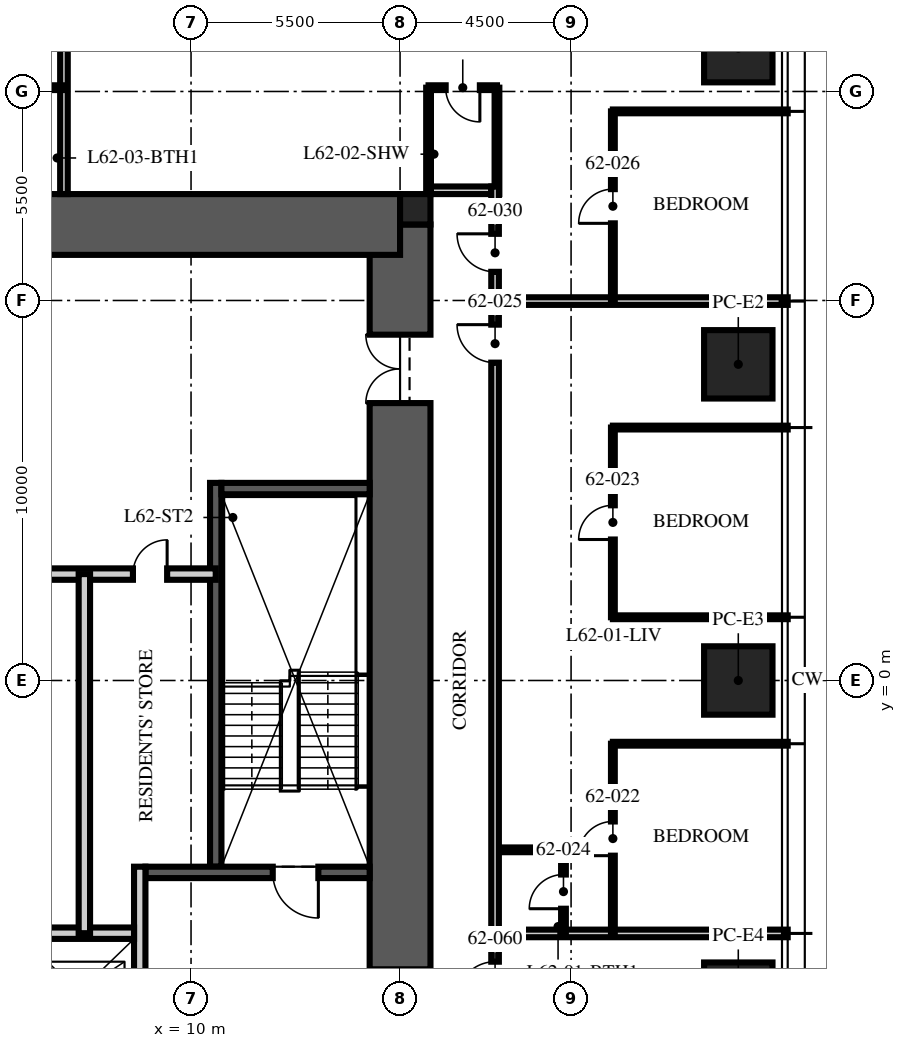
"""IFC4 building model, lengths in metres.
Left out: names, types, materials, properties, quantities, classifications, styles, units other than length and angle.
Written with IfcOpenShell. Run it as: python <this file> out.ifc"""

import sys

from ifc_helpers import new_model, si_unit, direction, frame, frame_2d, origin, origin_2d, place, context, subcontext, project, spatial, rectangle, extrude, element, fill, save


model = new_model("IFC4")
c1 = context("Model", 3, precision=1e-05, world=origin(), true_north=direction((0.0, 1.0)))
c2 = subcontext(c1, "Body", "Model", "MODEL_VIEW")
j1 = project(units=[si_unit("LENGTHUNIT", "METRE"), si_unit("PLANEANGLEUNIT", "RADIAN")], contexts=[c1])
p1 = place(None, origin())
s1 = spatial("IfcSite", under=j1, at=p1, CompositionType="ELEMENT")
p2 = place(p1, origin())
s2 = spatial("IfcBuilding", under=s1, at=p2, CompositionType="ELEMENT")
p3 = place(p2, frame((0.0, 0.0, 248.25)))
s3 = spatial("IfcBuildingStorey", under=s2, at=p3, CompositionType="ELEMENT", Elevation=248.25)
p4 = place(p3, frame((15.5, -12.0, -0.25), z_axis=(0.0, 0.0, 1.0), x_axis=(0.0, 1.0, 0.0)))
e1 = element("IfcWall", 1, at=p4, inside=s3, PredefinedType="SHEAR", context=c2, shape_type="SweptSolid", body=[
    extrude(rectangle(XDim=24.0, YDim=1.6, at=frame_2d((12.0, 0.0))), origin(), (0.0, 0.0, 1.0), 3.75),
])
p5 = place(p4, frame((3.2, 0.0, 0.25)))
e2 = element("IfcOpeningElement", 2, at=p5, cuts=e1, PredefinedType="OPENING", context=c2, shape_type="SweptSolid", body=[
    extrude(rectangle(XDim=1.2, YDim=2.1, at=frame_2d((0.6, 1.05))), frame((0.0, 0.81, 0.0), z_axis=(0.0, -1.0, 0.0), x_axis=(1.0, 0.0, 0.0)), (0.0, 0.0, 1.0), 1.62),
])
p6 = place(p4, frame((19.3, 0.0, 0.25)))
e3 = element("IfcOpeningElement", 3, at=p6, cuts=e1, PredefinedType="OPENING", context=c2, shape_type="SweptSolid", body=[
    extrude(rectangle(XDim=1.8, YDim=2.1, at=frame_2d((0.9, 1.05))), frame((0.0, 0.81, 0.0), z_axis=(0.0, -1.0, 0.0), x_axis=(1.0, 0.0, 0.0)), (0.0, 0.0, 1.0), 1.62),
])
p7 = place(p3, frame((-15.5, 12.0, -0.25), z_axis=(0.0, 0.0, 1.0), x_axis=(1.0, 0.0, 0.0)))
e4 = element("IfcWall", 4, at=p7, inside=s3, PredefinedType="SHEAR", context=c2, shape_type="SweptSolid", body=[
    extrude(rectangle(XDim=31.0, YDim=1.6, at=frame_2d((15.5, 0.0))), origin(), (0.0, 0.0, 1.0), 3.75),
])
p8 = place(p3, frame((15.9, 12.4, -0.25), z_axis=(0.0, 0.0, 1.0), x_axis=(1.0, 0.0, 0.0)))
e5 = element("IfcColumn", 5, at=p8, inside=s3, PredefinedType="COLUMN", context=c2, shape_type="SweptSolid", body=[
    extrude(rectangle(XDim=0.8, YDim=0.8, at=origin_2d()), origin(), (0.0, 0.0, 1.0), 3.75),
])
for number, where, z_axis, x_axis in (
    (6, (24.4, 16.64, 0.0), (0.0, 0.0, 1.0), (0.0, 1.0, 0.0)),
    (7, (24.4, 8.32, 0.0), (0.0, 0.0, 1.0), (0.0, 1.0, 0.0)),
    (8, (24.4, 0.0, 0.0), (0.0, 0.0, 1.0), (0.0, 1.0, 0.0)),
    (9, (24.4, -8.32, 0.0), (0.0, 0.0, 1.0), (0.0, 1.0, 0.0)),
):
    element("IfcColumn", number, at=place(p3, frame(where, z_axis=z_axis, x_axis=x_axis)), inside=s3, PredefinedType="COLUMN", context=c2, shape_type="SweptSolid", body=[
        extrude(rectangle(XDim=1.8, YDim=1.8, at=origin_2d()), origin(), (0.0, 0.0, 1.0), 3.75),
    ])
p9 = place(p3, frame((10.65, -4.9, 0.0), z_axis=(0.0, 0.0, 1.0), x_axis=(0.0, 1.0, 0.0)))
e10 = element("IfcWall", 10, at=p9, inside=s3, PredefinedType="SOLIDWALL", context=c2, shape_type="SweptSolid", body=[
    extrude(rectangle(XDim=10.1, YDim=0.3, at=frame_2d((5.05, 0.0))), origin(), (0.0, 0.0, 1.0), 3.5),
])
p10 = place(p3, frame((14.7, -5.05, 0.0), z_axis=(0.0, 0.0, 1.0), x_axis=(-1.0, 0.0, 0.0)))
e11 = element("IfcWall", 11, at=p10, inside=s3, PredefinedType="SOLIDWALL", context=c2, shape_type="SweptSolid", body=[
    extrude(rectangle(XDim=5.9, YDim=0.3, at=frame_2d((2.95, 0.0))), origin(), (0.0, 0.0, 1.0), 3.5),
])
p11 = place(p10, frame((1.35, 0.0, 0.0)))
e12 = element("IfcOpeningElement", 12, at=p11, cuts=e11, PredefinedType="OPENING", context=c2, shape_type="SweptSolid", body=[
    extrude(rectangle(XDim=1.2, YDim=2.1, at=frame_2d((0.6, 1.05))), frame((0.0, 0.16, 0.0), z_axis=(0.0, -1.0, 0.0), x_axis=(1.0, 0.0, 0.0)), (0.0, 0.0, 1.0), 0.32),
])
p12 = place(p3, frame((14.7, 5.05, 0.0), z_axis=(0.0, 0.0, 1.0), x_axis=(-1.0, 0.0, 0.0)))
e13 = element("IfcWall", 13, at=p12, inside=s3, PredefinedType="SOLIDWALL", context=c2, shape_type="SweptSolid", body=[
    extrude(rectangle(XDim=3.9, YDim=0.3, at=frame_2d((1.95, 0.0))), origin(), (0.0, 0.0, 1.0), 3.5),
])
p13 = place(p3, frame((8.65, -11.2, 0.0), z_axis=(0.0, 0.0, 1.0), x_axis=(0.0, 1.0, 0.0)))
e14 = element("IfcWall", 14, at=p13, inside=s3, PredefinedType="PARTITIONING", context=c2, shape_type="SweptSolid", body=[
    extrude(rectangle(XDim=6.3, YDim=0.3, at=frame_2d((3.15, 0.0))), origin(), (0.0, 0.0, 1.0), 3.5),
])
p14 = place(p13, frame((2.45, 0.0, 0.0)))
e15 = element("IfcOpeningElement", 15, at=p14, cuts=e14, PredefinedType="OPENING", context=c2, shape_type="SweptSolid", body=[
    extrude(rectangle(XDim=1.1, YDim=2.1, at=frame_2d((0.55, 1.05))), frame((0.0, 0.16, 0.0), z_axis=(0.0, -1.0, 0.0), x_axis=(1.0, 0.0, 0.0)), (0.0, 0.0, 1.0), 0.32),
])
p15 = place(p3, frame((-8.5, -6.65, 0.0), z_axis=(0.0, 0.0, 1.0), x_axis=(1.0, 0.0, 0.0)))
e16 = element("IfcWall", 16, at=p15, inside=s3, PredefinedType="PARTITIONING", context=c2, shape_type="SweptSolid", body=[
    extrude(rectangle(XDim=17.0, YDim=0.3, at=frame_2d((8.5, 0.0))), origin(), (0.0, 0.0, 1.0), 3.5),
])
p16 = place(p15, frame((7.8, 0.0, 0.0)))
e17 = element("IfcOpeningElement", 17, at=p16, cuts=e16, PredefinedType="OPENING", context=c2, shape_type="SweptSolid", body=[
    extrude(rectangle(XDim=1.3, YDim=2.4, at=frame_2d((0.65, 1.2))), frame((0.0, 0.16, 0.0), z_axis=(0.0, -1.0, 0.0), x_axis=(1.0, 0.0, 0.0)), (0.0, 0.0, 1.0), 0.32),
])
p17 = place(p15, frame((5.65, 0.0, 0.0)))
e18 = element("IfcOpeningElement", 18, at=p17, cuts=e16, PredefinedType="OPENING", context=c2, shape_type="SweptSolid", body=[
    extrude(rectangle(XDim=0.9, YDim=2.1, at=frame_2d((0.45, 1.05))), frame((0.0, 0.16, 0.0), z_axis=(0.0, -1.0, 0.0), x_axis=(1.0, 0.0, 0.0)), (0.0, 0.0, 1.0), 0.32),
])
p18 = place(p15, frame((10.4, 0.0, 0.0)))
e19 = element("IfcOpeningElement", 19, at=p18, cuts=e16, PredefinedType="OPENING", context=c2, shape_type="SweptSolid", body=[
    extrude(rectangle(XDim=0.9, YDim=2.1, at=frame_2d((0.45, 1.05))), frame((0.0, 0.16, 0.0), z_axis=(0.0, -1.0, 0.0), x_axis=(1.0, 0.0, 0.0)), (0.0, 0.0, 1.0), 0.32),
])
p19 = place(p3, frame((-10.65, 2.8, 0.0), z_axis=(0.0, 0.0, 1.0), x_axis=(1.0, 0.0, 0.0)))
e20 = element("IfcWall", 20, at=p19, inside=s3, PredefinedType="PARTITIONING", context=c2, shape_type="SweptSolid", body=[
    extrude(rectangle(XDim=21.3, YDim=0.3, at=frame_2d((10.65, 0.0))), origin(), (0.0, 0.0, 1.0), 3.5),
])
p20 = place(p19, frame((10.05, 0.0, 0.0)))
e21 = element("IfcOpeningElement", 21, at=p20, cuts=e20, PredefinedType="OPENING", context=c2, shape_type="SweptSolid", body=[
    extrude(rectangle(XDim=1.2, YDim=2.1, at=frame_2d((0.6, 1.05))), frame((0.0, 0.16, 0.0), z_axis=(0.0, -1.0, 0.0), x_axis=(1.0, 0.0, 0.0)), (0.0, 0.0, 1.0), 0.32),
])
p21 = place(p19, frame((19.121, 0.0, 0.0)))
e22 = element("IfcOpeningElement", 22, at=p21, cuts=e20, PredefinedType="OPENING", context=c2, shape_type="SweptSolid", body=[
    extrude(rectangle(XDim=0.9, YDim=2.1, at=frame_2d((0.45, 1.05))), frame((0.0, 0.16, 0.0), z_axis=(0.0, -1.0, 0.0), x_axis=(1.0, 0.0, 0.0)), (0.0, 0.0, 1.0), 0.32),
])
p22 = place(p3, frame((7.193, -6.65, 0.0), z_axis=(0.0, 0.0, 1.0), x_axis=(0.0, 1.0, 0.0)))
e23 = element("IfcWall", 23, at=p22, inside=s3, PredefinedType="PARTITIONING", context=c2, shape_type="SweptSolid", body=[
    extrude(rectangle(XDim=9.45, YDim=0.3, at=frame_2d((4.725, 0.0))), origin(), (0.0, 0.0, 1.0), 3.5),
])
p23 = place(p3, frame((16.3, 12.9, 0.0), z_axis=(0.0, 0.0, 1.0), x_axis=(1.0, 0.0, 0.0)))
e24 = element("IfcWall", 24, at=p23, inside=s3, PredefinedType="PARTITIONING", context=c2, shape_type="SweptSolid", body=[
    extrude(rectangle(XDim=1.6, YDim=0.2, at=frame_2d((0.8, 0.0))), origin(), (0.0, 0.0, 1.0), 2.3),
])
p24 = place(p3, frame((18.1, -6.656, 0.0), z_axis=(0.0, 0.0, 1.0), x_axis=(1.0, 0.0, 0.0)))
e25 = element("IfcWall", 25, at=p24, inside=s3, PredefinedType="PARTITIONING", context=c2, shape_type="SweptSolid", body=[
    extrude(rectangle(XDim=7.6, YDim=0.2, at=frame_2d((3.8, 0.0))), origin(), (0.0, 0.0, 1.0), 2.91),
])
for number, where, z_axis, x_axis in (
    (26, (21.1, -1.664, 0.0), (0.0, 0.0, 1.0), (1.0, 0.0, 0.0)),
    (27, (21.1, 1.664, 0.0), (0.0, 0.0, 1.0), (1.0, 0.0, 0.0)),
    (28, (21.1, 6.656, 0.0), (0.0, 0.0, 1.0), (1.0, 0.0, 0.0)),
):
    element("IfcWall", number, at=place(p3, frame(where, z_axis=z_axis, x_axis=x_axis)), inside=s3, PredefinedType="PARTITIONING", context=c2, shape_type="SweptSolid", body=[
        extrude(rectangle(XDim=4.6, YDim=0.1, at=frame_2d((2.3, 0.0))), origin(), (0.0, 0.0, 1.0), 2.91),
    ])
p25 = place(p3, frame((18.1, 9.984, 0.0), z_axis=(0.0, 0.0, 1.0), x_axis=(1.0, 0.0, 0.0)))
e29 = element("IfcWall", 29, at=p25, inside=s3, PredefinedType="PARTITIONING", context=c2, shape_type="SweptSolid", body=[
    extrude(rectangle(XDim=7.6, YDim=0.2, at=frame_2d((3.8, 0.0))), origin(), (0.0, 0.0, 1.0), 2.91),
])
p26 = place(p3, frame((21.1, 14.976, 0.0), z_axis=(0.0, 0.0, 1.0), x_axis=(1.0, 0.0, 0.0)))
e30 = element("IfcWall", 30, at=p26, inside=s3, PredefinedType="PARTITIONING", context=c2, shape_type="SweptSolid", body=[
    extrude(rectangle(XDim=4.6, YDim=0.1, at=frame_2d((2.3, 0.0))), origin(), (0.0, 0.0, 1.0), 2.91),
])
p27 = place(p3, frame((6.656, 12.8, 0.0), z_axis=(0.0, 0.0, 1.0), x_axis=(0.0, 1.0, 0.0)))
e31 = element("IfcWall", 31, at=p27, inside=s3, PredefinedType="PARTITIONING", context=c2, shape_type="SweptSolid", body=[
    extrude(rectangle(XDim=12.9, YDim=0.2, at=frame_2d((6.45, 0.0))), origin(), (0.0, 0.0, 1.0), 2.91),
])
p28 = place(p3, frame((21.1, -6.656, 0.0), z_axis=(0.0, 0.0, 1.0), x_axis=(0.0, 1.0, 0.0)))
e32 = element("IfcWall", 32, at=p28, inside=s3, PredefinedType="PARTITIONING", context=c2, shape_type="SweptSolid", body=[
    extrude(rectangle(XDim=4.992, YDim=0.1, at=frame_2d((2.496, 0.0))), origin(), (0.0, 0.0, 1.0), 2.81),
])
p29 = place(p28, frame((2.046, 0.0, 0.0)))
e33 = element("IfcOpeningElement", 33, at=p29, cuts=e32, PredefinedType="OPENING", context=c2, shape_type="SweptSolid", body=[
    extrude(rectangle(XDim=0.9, YDim=2.1, at=frame_2d((0.45, 1.05))), frame((0.0, 0.06, 0.0), z_axis=(0.0, -1.0, 0.0), x_axis=(1.0, 0.0, 0.0)), (0.0, 0.0, 1.0), 0.12),
])
p30 = place(p3, frame((21.1, 1.664, 0.0), z_axis=(0.0, 0.0, 1.0), x_axis=(0.0, 1.0, 0.0)))
e34 = element("IfcWall", 34, at=p30, inside=s3, PredefinedType="PARTITIONING", context=c2, shape_type="SweptSolid", body=[
    extrude(rectangle(XDim=4.992, YDim=0.1, at=frame_2d((2.496, 0.0))), origin(), (0.0, 0.0, 1.0), 2.81),
])
p31 = place(p30, frame((2.046, 0.0, 0.0)))
e35 = element("IfcOpeningElement", 35, at=p31, cuts=e34, PredefinedType="OPENING", context=c2, shape_type="SweptSolid", body=[
    extrude(rectangle(XDim=0.9, YDim=2.1, at=frame_2d((0.45, 1.05))), frame((0.0, 0.06, 0.0), z_axis=(0.0, -1.0, 0.0), x_axis=(1.0, 0.0, 0.0)), (0.0, 0.0, 1.0), 0.12),
])
p32 = place(p3, frame((19.8, -6.656, 0.0), z_axis=(0.0, 0.0, 1.0), x_axis=(0.0, 1.0, 0.0)))
e36 = element("IfcWall", 36, at=p32, inside=s3, PredefinedType="PARTITIONING", context=c2, shape_type="SweptSolid", body=[
    extrude(rectangle(XDim=2.2, YDim=0.125, at=frame_2d((1.1, 0.0))), origin(), (0.0, 0.0, 1.0), 3.5),
])
p33 = place(p32, frame((0.65, 0.0, 0.0)))
e37 = element("IfcOpeningElement", 37, at=p33, cuts=e36, PredefinedType="OPENING", context=c2, shape_type="SweptSolid", body=[
    extrude(rectangle(XDim=0.9, YDim=2.1, at=frame_2d((0.45, 1.05))), frame((0.0, 0.073, 0.0), z_axis=(0.0, -1.0, 0.0), x_axis=(1.0, 0.0, 0.0)), (0.0, 0.0, 1.0), 0.145),
])
p34 = place(p3, frame((18.1, -4.456, 0.0), z_axis=(0.0, 0.0, 1.0), x_axis=(1.0, 0.0, 0.0)))
e38 = element("IfcWall", 38, at=p34, inside=s3, PredefinedType="PARTITIONING", context=c2, shape_type="SweptSolid", body=[
    extrude(rectangle(XDim=1.7, YDim=0.125, at=frame_2d((0.85, 0.0))), origin(), (0.0, 0.0, 1.0), 3.5),
])
p35 = place(p3, frame((21.1, 9.984, 0.0), z_axis=(0.0, 0.0, 1.0), x_axis=(0.0, 1.0, 0.0)))
e39 = element("IfcWall", 39, at=p35, inside=s3, PredefinedType="PARTITIONING", context=c2, shape_type="SweptSolid", body=[
    extrude(rectangle(XDim=4.992, YDim=0.1, at=frame_2d((2.496, 0.0))), origin(), (0.0, 0.0, 1.0), 2.81),
])
p36 = place(p35, frame((2.046, 0.0, 0.0)))
e40 = element("IfcOpeningElement", 40, at=p36, cuts=e39, PredefinedType="OPENING", context=c2, shape_type="SweptSolid", body=[
    extrude(rectangle(XDim=0.9, YDim=2.1, at=frame_2d((0.45, 1.05))), frame((0.0, 0.06, 0.0), z_axis=(0.0, -1.0, 0.0), x_axis=(1.0, 0.0, 0.0)), (0.0, 0.0, 1.0), 0.12),
])
p37 = place(p3, frame((18.05, 15.6, 0.0), z_axis=(0.0, 0.0, 1.0), x_axis=(-1.0, 0.0, 0.0)))
e41 = element("IfcWall", 41, at=p37, inside=s3, PredefinedType="PARTITIONING", context=c2, shape_type="SweptSolid", body=[
    extrude(rectangle(XDim=1.8, YDim=0.125, at=frame_2d((0.9, 0.0))), origin(), (0.0, 0.0, 1.0), 2.3),
])
p38 = place(p37, frame((0.45, 0.0, 0.0)))
e42 = element("IfcOpeningElement", 42, at=p38, cuts=e41, PredefinedType="OPENING", context=c2, shape_type="SweptSolid", body=[
    extrude(rectangle(XDim=0.9, YDim=2.1, at=frame_2d((0.45, 1.05))), frame((0.0, 0.073, 0.0), z_axis=(0.0, -1.0, 0.0), x_axis=(1.0, 0.0, 0.0)), (0.0, 0.0, 1.0), 0.145),
])
for number, where, z_axis, x_axis in (
    (43, (18.05, 12.8, 0.0), (0.0, 0.0, 1.0), (0.0, 1.0, 0.0)),
    (44, (16.25, 12.8, 0.0), (0.0, 0.0, 1.0), (0.0, 1.0, 0.0)),
):
    element("IfcWall", number, at=place(p3, frame(where, z_axis=z_axis, x_axis=x_axis)), inside=s3, PredefinedType="PARTITIONING", context=c2, shape_type="SweptSolid", body=[
        extrude(rectangle(XDim=2.8, YDim=0.125, at=frame_2d((1.4, 0.0))), origin(), (0.0, 0.0, 1.0), 2.3),
    ])
p39 = place(p3, frame((6.656, 15.6, 0.0), z_axis=(0.0, 0.0, 1.0), x_axis=(-1.0, 0.0, 0.0)))
e45 = element("IfcWall", 45, at=p39, inside=s3, PredefinedType="PARTITIONING", context=c2, shape_type="SweptSolid", body=[
    extrude(rectangle(XDim=5.5, YDim=0.125, at=frame_2d((2.75, 0.0))), origin(), (0.0, 0.0, 1.0), 2.81),
])
p40 = place(p39, frame((0.65, 0.0, 0.0)))
e46 = element("IfcOpeningElement", 46, at=p40, cuts=e45, PredefinedType="OPENING", context=c2, shape_type="SweptSolid", body=[
    extrude(rectangle(XDim=0.9, YDim=2.1, at=frame_2d((0.45, 1.05))), frame((0.0, 0.073, 0.0), z_axis=(0.0, -1.0, 0.0), x_axis=(1.0, 0.0, 0.0)), (0.0, 0.0, 1.0), 0.145),
])
p41 = place(p39, frame((2.65, 0.0, 0.0)))
e47 = element("IfcOpeningElement", 47, at=p41, cuts=e45, PredefinedType="OPENING", context=c2, shape_type="SweptSolid", body=[
    extrude(rectangle(XDim=0.9, YDim=2.1, at=frame_2d((0.45, 1.05))), frame((0.0, 0.073, 0.0), z_axis=(0.0, -1.0, 0.0), x_axis=(1.0, 0.0, 0.0)), (0.0, 0.0, 1.0), 0.145),
])
p42 = place(p39, frame((4.3, 0.0, 0.0)))
e48 = element("IfcOpeningElement", 48, at=p42, cuts=e45, PredefinedType="OPENING", context=c2, shape_type="SweptSolid", body=[
    extrude(rectangle(XDim=0.9, YDim=2.1, at=frame_2d((0.45, 1.05))), frame((0.0, 0.073, 0.0), z_axis=(0.0, -1.0, 0.0), x_axis=(1.0, 0.0, 0.0)), (0.0, 0.0, 1.0), 0.145),
])
p43 = place(p3, frame((18.0, -13.0, 0.0), z_axis=(0.0, 0.0, 1.0), x_axis=(0.0, 1.0, 0.0)))
e49 = element("IfcWall", 49, at=p43, inside=s3, PredefinedType="PARTITIONING", context=c2, shape_type="SweptSolid", body=[
    extrude(rectangle(XDim=26.0, YDim=0.2, at=frame_2d((13.0, 0.0))), origin(), (0.0, 0.0, 1.0), 2.6),
])
p44 = place(p43, frame((21.364, 0.0, 0.0)))
e50 = element("IfcOpeningElement", 50, at=p44, cuts=e49, PredefinedType="OPENING", context=c2, shape_type="SweptSolid", body=[
    extrude(rectangle(XDim=1.0, YDim=2.2, at=frame_2d((0.5, 1.1))), frame((0.0, 0.11, 0.0), z_axis=(0.0, -1.0, 0.0), x_axis=(1.0, 0.0, 0.0)), (0.0, 0.0, 1.0), 0.22),
])
p45 = place(p43, frame((23.754, 0.0, 0.0)))
e51 = element("IfcOpeningElement", 51, at=p45, cuts=e49, PredefinedType="OPENING", context=c2, shape_type="SweptSolid", body=[
    extrude(rectangle(XDim=1.0, YDim=2.2, at=frame_2d((0.5, 1.1))), frame((0.0, 0.11, 0.0), z_axis=(0.0, -1.0, 0.0), x_axis=(1.0, 0.0, 0.0)), (0.0, 0.0, 1.0), 0.22),
])
p46 = place(p43, frame((4.6, 0.0, 0.0)))
e52 = element("IfcOpeningElement", 52, at=p46, cuts=e49, PredefinedType="OPENING", context=c2, shape_type="SweptSolid", body=[
    extrude(rectangle(XDim=1.0, YDim=2.2, at=frame_2d((0.5, 1.1))), frame((0.0, 0.11, 0.0), z_axis=(0.0, -1.0, 0.0), x_axis=(1.0, 0.0, 0.0)), (0.0, 0.0, 1.0), 0.22),
])
p47 = place(p11, origin())
e53 = element("IfcDoor", 53, at=p47, inside=s3, OperationType="SINGLE_SWING_LEFT", PredefinedType="DOOR", context=c2, shape_type="SweptSolid", body=[
    extrude(rectangle(XDim=1.2, YDim=2.1, at=frame_2d((0.6, 1.05))), frame((0.0, 0.025, 0.0), z_axis=(0.0, -1.0, 0.0), x_axis=(1.0, 0.0, 0.0)), (0.0, 0.0, 1.0), 0.05),
])
fill(e12, e53)
p48 = place(p6, origin())
e54 = element("IfcDoor", 54, at=p48, inside=s3, OperationType="DOUBLE_DOOR_SINGLE_SWING", PredefinedType="DOOR", context=c2, shape_type="SweptSolid", body=[
    extrude(rectangle(XDim=1.8, YDim=2.1, at=frame_2d((0.9, 1.05))), frame((0.0, 0.025, 0.0), z_axis=(0.0, -1.0, 0.0), x_axis=(1.0, 0.0, 0.0)), (0.0, 0.0, 1.0), 0.05),
])
fill(e3, e54)
p49 = place(p21, origin())
e55 = element("IfcDoor", 55, at=p49, inside=s3, OperationType="SINGLE_SWING_RIGHT", PredefinedType="DOOR", context=c2, shape_type="SweptSolid", body=[
    extrude(rectangle(XDim=0.9, YDim=2.1, at=frame_2d((0.45, 1.05))), frame((0.0, 0.025, 0.0), z_axis=(0.0, -1.0, 0.0), x_axis=(1.0, 0.0, 0.0)), (0.0, 0.0, 1.0), 0.05),
])
fill(e22, e55)
p50 = place(p29, origin())
e56 = element("IfcDoor", 56, at=p50, inside=s3, OperationType="SINGLE_SWING_LEFT", PredefinedType="DOOR", context=c2, shape_type="SweptSolid", body=[
    extrude(rectangle(XDim=0.9, YDim=2.1, at=frame_2d((0.45, 1.05))), frame((0.0, 0.025, 0.0), z_axis=(0.0, -1.0, 0.0), x_axis=(1.0, 0.0, 0.0)), (0.0, 0.0, 1.0), 0.05),
])
fill(e33, e56)
p51 = place(p31, origin())
e57 = element("IfcDoor", 57, at=p51, inside=s3, OperationType="SINGLE_SWING_LEFT", PredefinedType="DOOR", context=c2, shape_type="SweptSolid", body=[
    extrude(rectangle(XDim=0.9, YDim=2.1, at=frame_2d((0.45, 1.05))), frame((0.0, 0.025, 0.0), z_axis=(0.0, -1.0, 0.0), x_axis=(1.0, 0.0, 0.0)), (0.0, 0.0, 1.0), 0.05),
])
fill(e35, e57)
p52 = place(p33, origin())
e58 = element("IfcDoor", 58, at=p52, inside=s3, OperationType="SINGLE_SWING_LEFT", PredefinedType="DOOR", context=c2, shape_type="SweptSolid", body=[
    extrude(rectangle(XDim=0.9, YDim=2.1, at=frame_2d((0.45, 1.05))), frame((0.0, 0.025, 0.0), z_axis=(0.0, -1.0, 0.0), x_axis=(1.0, 0.0, 0.0)), (0.0, 0.0, 1.0), 0.05),
])
fill(e37, e58)
p53 = place(p44, origin())
e59 = element("IfcDoor", 59, at=p53, inside=s3, OperationType="SINGLE_SWING_RIGHT", PredefinedType="DOOR", context=c2, shape_type="SweptSolid", body=[
    extrude(rectangle(XDim=1.0, YDim=2.2, at=frame_2d((0.5, 1.1))), frame((0.0, 0.025, 0.0), z_axis=(0.0, -1.0, 0.0), x_axis=(1.0, 0.0, 0.0)), (0.0, 0.0, 1.0), 0.05),
])
fill(e50, e59)
p54 = place(p36, origin())
e60 = element("IfcDoor", 60, at=p54, inside=s3, OperationType="SINGLE_SWING_LEFT", PredefinedType="DOOR", context=c2, shape_type="SweptSolid", body=[
    extrude(rectangle(XDim=0.9, YDim=2.1, at=frame_2d((0.45, 1.05))), frame((0.0, 0.025, 0.0), z_axis=(0.0, -1.0, 0.0), x_axis=(1.0, 0.0, 0.0)), (0.0, 0.0, 1.0), 0.05),
])
fill(e40, e60)
p55 = place(p38, origin())
e61 = element("IfcDoor", 61, at=p55, inside=s3, OperationType="SINGLE_SWING_LEFT", PredefinedType="DOOR", context=c2, shape_type="SweptSolid", body=[
    extrude(rectangle(XDim=0.9, YDim=2.1, at=frame_2d((0.45, 1.05))), frame((0.0, 0.025, 0.0), z_axis=(0.0, -1.0, 0.0), x_axis=(1.0, 0.0, 0.0)), (0.0, 0.0, 1.0), 0.05),
])
fill(e42, e61)
p56 = place(p45, origin())
e62 = element("IfcDoor", 62, at=p56, inside=s3, OperationType="SINGLE_SWING_RIGHT", PredefinedType="DOOR", context=c2, shape_type="SweptSolid", body=[
    extrude(rectangle(XDim=1.0, YDim=2.2, at=frame_2d((0.5, 1.1))), frame((0.0, 0.025, 0.0), z_axis=(0.0, -1.0, 0.0), x_axis=(1.0, 0.0, 0.0)), (0.0, 0.0, 1.0), 0.05),
])
fill(e51, e62)
p57 = place(p46, origin())
e63 = element("IfcDoor", 63, at=p57, inside=s3, OperationType="SINGLE_SWING_LEFT", PredefinedType="DOOR", context=c2, shape_type="SweptSolid", body=[
    extrude(rectangle(XDim=1.0, YDim=2.2, at=frame_2d((0.5, 1.1))), frame((0.0, 0.025, 0.0), z_axis=(0.0, -1.0, 0.0), x_axis=(1.0, 0.0, 0.0)), (0.0, 0.0, 1.0), 0.05),
])
fill(e52, e63)
save(model, sys.argv[1])
